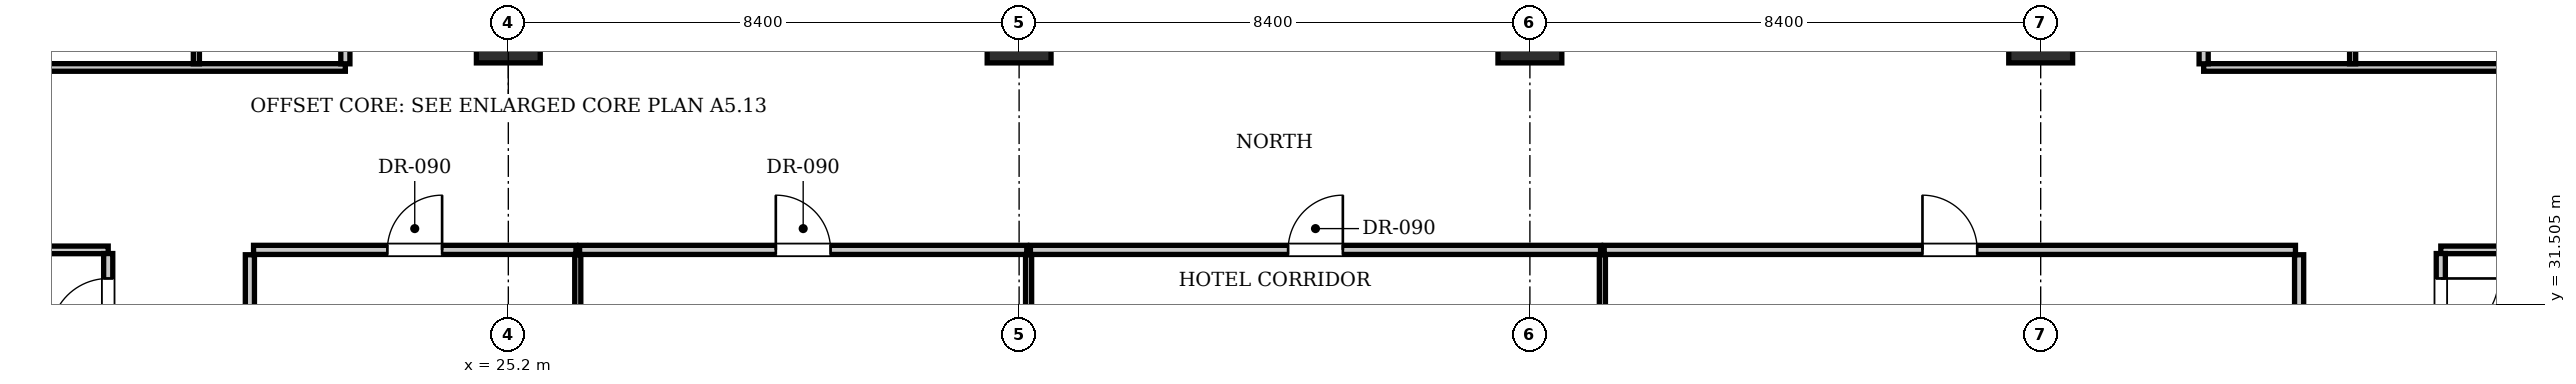
"""IFC4 building model, lengths in metres.
Left out: names, types, materials, properties, quantities, classifications, styles, units other than length and angle.
Written with IfcOpenShell. Run it as: python <this file> out.ifc"""

import sys

from ifc_helpers import new_model, si_unit, direction, frame, frame_2d, origin, origin_2d, place, context, subcontext, project, spatial, rectangle, extrude, element, fill, save


model = new_model("IFC4")
c1 = context("Model", 3, precision=1e-05, world=origin(), true_north=direction((0.0, 1.0)))
c2 = subcontext(c1, "Body", "Model", "MODEL_VIEW")
j1 = project(units=[si_unit("LENGTHUNIT", "METRE"), si_unit("PLANEANGLEUNIT", "RADIAN")], contexts=[c1])
p1 = place(None, origin())
s1 = spatial("IfcSite", under=j1, at=p1, CompositionType="ELEMENT")
p2 = place(p1, origin())
s2 = spatial("IfcBuilding", under=s1, at=p2, CompositionType="ELEMENT")
p3 = place(p2, frame((0.0, 0.0, 107.8)))
s3 = spatial("IfcBuildingStorey", under=s2, at=p3, CompositionType="ELEMENT", Elevation=107.8)
for number, where, z_axis, x_axis in (
    (1, (25.2, 36.0, 0.0), (0.0, 0.0, 1.0), (1.0, 0.0, 0.0)),
    (2, (33.6, 36.0, 0.0), (0.0, 0.0, 1.0), (1.0, 0.0, 0.0)),
    (3, (42.0, 36.0, 0.0), (0.0, 0.0, 1.0), (1.0, 0.0, 0.0)),
    (4, (50.4, 36.0, 0.0), (0.0, 0.0, 1.0), (1.0, 0.0, 0.0)),
):
    element("IfcColumn", number, at=place(p3, frame(where, z_axis=z_axis, x_axis=x_axis)), inside=s3, PredefinedType="COLUMN", context=c2, shape_type="SweptSolid", body=[
        extrude(rectangle(XDim=1.05, YDim=1.05, at=origin_2d()), origin(), (0.0, 0.0, 1.0), 3.85),
    ])
p4 = place(p3, frame((20.95, 24.98, 0.0), z_axis=(0.0, 0.0, 1.0), x_axis=(0.0, 1.0, 0.0)))
e5 = element("IfcWall", 5, at=p4, inside=s3, PredefinedType="PARTITIONING", context=c2, shape_type="SweptSolid", body=[
    extrude(rectangle(XDim=7.34, YDim=0.15, at=frame_2d((3.67, 0.0))), origin(), (0.0, 0.0, 1.0), 3.293),
])
p5 = place(p3, frame((54.65, 24.98, 0.0), z_axis=(0.0, 0.0, 1.0), x_axis=(0.0, 1.0, 0.0)))
e6 = element("IfcWall", 6, at=p5, inside=s3, PredefinedType="PARTITIONING", context=c2, shape_type="SweptSolid", body=[
    extrude(rectangle(XDim=7.34, YDim=0.15, at=frame_2d((3.67, 0.0))), origin(), (0.0, 0.0, 1.0), 3.3),
])
p6 = place(p3, frame((21.01, 32.4, 0.0), z_axis=(0.0, 0.0, 1.0), x_axis=(1.0, 0.0, 0.0)))
e7 = element("IfcWall", 7, at=p6, inside=s3, PredefinedType="PARTITIONING", context=c2, shape_type="SweptSolid", body=[
    extrude(rectangle(XDim=5.302, YDim=0.15, at=frame_2d((2.651, 0.0))), origin(), (0.0, 0.0, 1.0), 3.61),
])
p7 = place(p6, frame((2.201, 0.0, 0.0)))
e8 = element("IfcOpeningElement", 8, at=p7, cuts=e7, PredefinedType="OPENING", context=c2, shape_type="SweptSolid", body=[
    extrude(rectangle(XDim=0.9, YDim=2.1, at=frame_2d((0.45, 1.05))), frame((0.0, 0.085, 0.0), z_axis=(0.0, -1.0, 0.0), x_axis=(1.0, 0.0, 0.0)), (0.0, 0.0, 1.0), 0.17),
])
p8 = place(p3, frame((26.342, 24.98, 0.0), z_axis=(0.0, 0.0, 1.0), x_axis=(0.0, 1.0, 0.0)))
e9 = element("IfcWall", 9, at=p8, inside=s3, PredefinedType="PARTITIONING", context=c2, shape_type="SweptSolid", body=[
    extrude(rectangle(XDim=7.34, YDim=0.1, at=frame_2d((3.67, 0.0))), origin(), (0.0, 0.0, 1.0), 3.61),
])
p9 = place(p3, frame((26.372, 32.4, 0.0), z_axis=(0.0, 0.0, 1.0), x_axis=(1.0, 0.0, 0.0)))
e10 = element("IfcWall", 10, at=p9, inside=s3, PredefinedType="PARTITIONING", context=c2, shape_type="SweptSolid", body=[
    extrude(rectangle(XDim=7.354, YDim=0.15, at=frame_2d((3.677, 0.0))), origin(), (0.0, 0.0, 1.0), 3.61),
])
p10 = place(p9, frame((3.227, 0.0, 0.0)))
e11 = element("IfcOpeningElement", 11, at=p10, cuts=e10, PredefinedType="OPENING", context=c2, shape_type="SweptSolid", body=[
    extrude(rectangle(XDim=0.9, YDim=2.1, at=frame_2d((0.45, 1.05))), frame((0.0, 0.085, 0.0), z_axis=(0.0, -1.0, 0.0), x_axis=(1.0, 0.0, 0.0)), (0.0, 0.0, 1.0), 0.17),
])
p11 = place(p3, frame((33.756, 24.98, 0.0), z_axis=(0.0, 0.0, 1.0), x_axis=(0.0, 1.0, 0.0)))
e12 = element("IfcWall", 12, at=p11, inside=s3, PredefinedType="PARTITIONING", context=c2, shape_type="SweptSolid", body=[
    extrude(rectangle(XDim=7.34, YDim=0.1, at=frame_2d((3.67, 0.0))), origin(), (0.0, 0.0, 1.0), 2.999),
])
p12 = place(p3, frame((33.786, 32.4, 0.0), z_axis=(0.0, 0.0, 1.0), x_axis=(1.0, 0.0, 0.0)))
e13 = element("IfcWall", 13, at=p12, inside=s3, PredefinedType="PARTITIONING", context=c2, shape_type="SweptSolid", body=[
    extrude(rectangle(XDim=9.376, YDim=0.15, at=frame_2d((4.688, 0.0))), origin(), (0.0, 0.0, 1.0), 3.61),
])
p13 = place(p12, frame((4.238, 0.0, 0.0)))
e14 = element("IfcOpeningElement", 14, at=p13, cuts=e13, PredefinedType="OPENING", context=c2, shape_type="SweptSolid", body=[
    extrude(rectangle(XDim=0.9, YDim=2.1, at=frame_2d((0.45, 1.05))), frame((0.0, 0.085, 0.0), z_axis=(0.0, -1.0, 0.0), x_axis=(1.0, 0.0, 0.0)), (0.0, 0.0, 1.0), 0.17),
])
p14 = place(p3, frame((43.192, 24.98, 0.0), z_axis=(0.0, 0.0, 1.0), x_axis=(0.0, 1.0, 0.0)))
e15 = element("IfcWall", 15, at=p14, inside=s3, PredefinedType="PARTITIONING", context=c2, shape_type="SweptSolid", body=[
    extrude(rectangle(XDim=7.34, YDim=0.1, at=frame_2d((3.67, 0.0))), origin(), (0.0, 0.0, 1.0), 3.61),
])
p15 = place(p3, frame((43.222, 32.4, 0.0), z_axis=(0.0, 0.0, 1.0), x_axis=(1.0, 0.0, 0.0)))
e16 = element("IfcWall", 16, at=p15, inside=s3, PredefinedType="PARTITIONING", context=c2, shape_type="SweptSolid", body=[
    extrude(rectangle(XDim=11.368, YDim=0.15, at=frame_2d((5.684, 0.0))), origin(), (0.0, 0.0, 1.0), 3.61),
])
p16 = place(p15, frame((5.234, 0.0, 0.0)))
e17 = element("IfcOpeningElement", 17, at=p16, cuts=e16, PredefinedType="OPENING", context=c2, shape_type="SweptSolid", body=[
    extrude(rectangle(XDim=0.9, YDim=2.1, at=frame_2d((0.45, 1.05))), frame((0.0, 0.085, 0.0), z_axis=(0.0, -1.0, 0.0), x_axis=(1.0, 0.0, 0.0)), (0.0, 0.0, 1.0), 0.17),
])
p17 = place(p3, frame((10.9, 32.4, 0.0), z_axis=(0.0, 0.0, 1.0), x_axis=(1.0, 0.0, 0.0)))
e18 = element("IfcWall", 18, at=p17, inside=s3, PredefinedType="PARTITIONING", context=c2, shape_type="SweptSolid", body=[
    extrude(rectangle(XDim=7.72, YDim=0.125, at=frame_2d((3.86, 0.0))), origin(), (0.0, 0.0, 1.0), 3.61),
])
p18 = place(p3, frame((56.98, 32.4, 0.0), z_axis=(0.0, 0.0, 1.0), x_axis=(1.0, 0.0, 0.0)))
e19 = element("IfcWall", 19, at=p18, inside=s3, PredefinedType="PARTITIONING", context=c2, shape_type="SweptSolid", body=[
    extrude(rectangle(XDim=7.72, YDim=0.125, at=frame_2d((3.86, 0.0))), origin(), (0.0, 0.0, 1.0), 3.61),
])
p19 = place(p3, frame((18.62, 30.57, 0.0), z_axis=(0.0, 0.0, 1.0), x_axis=(0.0, 1.0, 0.0)))
e20 = element("IfcWall", 20, at=p19, inside=s3, PredefinedType="PARTITIONING", context=c2, shape_type="SweptSolid", body=[
    extrude(rectangle(XDim=1.77, YDim=0.15, at=frame_2d((0.885, 0.0))), origin(), (0.0, 0.0, 1.0), 3.61),
])
p20 = place(p19, frame((0.41, 0.0, 0.0)))
e21 = element("IfcOpeningElement", 21, at=p20, cuts=e20, PredefinedType="OPENING", context=c2, shape_type="SweptSolid", body=[
    extrude(rectangle(XDim=0.95, YDim=2.15, at=frame_2d((0.475, 1.075))), frame((0.0, 0.085, 0.0), z_axis=(0.0, -1.0, 0.0), x_axis=(1.0, 0.0, 0.0)), (0.0, 0.0, 1.0), 0.17),
])
p21 = place(p3, frame((56.98, 30.57, 0.0), z_axis=(0.0, 0.0, 1.0), x_axis=(0.0, 1.0, 0.0)))
e22 = element("IfcWall", 22, at=p21, inside=s3, PredefinedType="PARTITIONING", context=c2, shape_type="SweptSolid", body=[
    extrude(rectangle(XDim=1.77, YDim=0.15, at=frame_2d((0.885, 0.0))), origin(), (0.0, 0.0, 1.0), 3.61),
])
p22 = place(p21, frame((0.41, 0.0, 0.0)))
e23 = element("IfcOpeningElement", 23, at=p22, cuts=e22, PredefinedType="OPENING", context=c2, shape_type="SweptSolid", body=[
    extrude(rectangle(XDim=0.95, YDim=2.15, at=frame_2d((0.475, 1.075))), frame((0.0, 0.085, 0.0), z_axis=(0.0, -1.0, 0.0), x_axis=(1.0, 0.0, 0.0)), (0.0, 0.0, 1.0), 0.17),
])
p23 = place(p3, frame((10.9, 35.4, 0.0), z_axis=(0.0, 0.0, 1.0), x_axis=(1.0, 0.0, 0.0)))
e24 = element("IfcWall", 24, at=p23, inside=s3, PredefinedType="PARTITIONING", context=c2, shape_type="SweptSolid", body=[
    extrude(rectangle(XDim=11.62, YDim=0.125, at=frame_2d((5.81, 0.0))), origin(), (0.0, 0.0, 1.0), 3.61),
])
p24 = place(p3, frame((53.08, 35.4, 0.0), z_axis=(0.0, 0.0, 1.0), x_axis=(1.0, 0.0, 0.0)))
e25 = element("IfcWall", 25, at=p24, inside=s3, PredefinedType="PARTITIONING", context=c2, shape_type="SweptSolid", body=[
    extrude(rectangle(XDim=11.62, YDim=0.125, at=frame_2d((5.81, 0.0))), origin(), (0.0, 0.0, 1.0), 3.61),
])
p25 = place(p3, frame((22.52, 35.46, 0.0), z_axis=(0.0, 0.0, 1.0), x_axis=(0.0, 1.0, 0.0)))
e26 = element("IfcWall", 26, at=p25, inside=s3, PredefinedType="PARTITIONING", context=c2, shape_type="SweptSolid", body=[
    extrude(rectangle(XDim=2.29, YDim=0.15, at=frame_2d((1.145, 0.0))), origin(), (0.0, 0.0, 1.0), 3.61),
])
p26 = place(p3, frame((20.07, 35.46, 0.0), z_axis=(0.0, 0.0, 1.0), x_axis=(0.0, 1.0, 0.0)))
e27 = element("IfcWall", 27, at=p26, inside=s3, PredefinedType="PARTITIONING", context=c2, shape_type="SweptSolid", body=[
    extrude(rectangle(XDim=2.29, YDim=0.1, at=frame_2d((1.145, 0.0))), origin(), (0.0, 0.0, 1.0), 3.61),
])
p27 = place(p3, frame((53.08, 35.46, 0.0), z_axis=(0.0, 0.0, 1.0), x_axis=(0.0, 1.0, 0.0)))
e28 = element("IfcWall", 28, at=p27, inside=s3, PredefinedType="PARTITIONING", context=c2, shape_type="SweptSolid", body=[
    extrude(rectangle(XDim=2.29, YDim=0.15, at=frame_2d((1.145, 0.0))), origin(), (0.0, 0.0, 1.0), 3.61),
])
p28 = place(p3, frame((55.53, 35.46, 0.0), z_axis=(0.0, 0.0, 1.0), x_axis=(0.0, 1.0, 0.0)))
e29 = element("IfcWall", 29, at=p28, inside=s3, PredefinedType="PARTITIONING", context=c2, shape_type="SweptSolid", body=[
    extrude(rectangle(XDim=2.29, YDim=0.1, at=frame_2d((1.145, 0.0))), origin(), (0.0, 0.0, 1.0), 3.61),
])
p29 = place(p7, origin())
e30 = element("IfcDoor", 30, at=p29, inside=s3, OperationType="SINGLE_SWING_RIGHT", PredefinedType="DOOR", context=c2, shape_type="SweptSolid", body=[
    extrude(rectangle(XDim=0.9, YDim=2.1, at=frame_2d((0.45, 1.05))), frame((0.0, 0.025, 0.0), z_axis=(0.0, -1.0, 0.0), x_axis=(1.0, 0.0, 0.0)), (0.0, 0.0, 1.0), 0.05),
])
fill(e8, e30)
p30 = place(p10, origin())
e31 = element("IfcDoor", 31, at=p30, inside=s3, OperationType="SINGLE_SWING_LEFT", PredefinedType="DOOR", context=c2, shape_type="SweptSolid", body=[
    extrude(rectangle(XDim=0.9, YDim=2.1, at=frame_2d((0.45, 1.05))), frame((0.0, 0.025, 0.0), z_axis=(0.0, -1.0, 0.0), x_axis=(1.0, 0.0, 0.0)), (0.0, 0.0, 1.0), 0.05),
])
fill(e11, e31)
p31 = place(p13, origin())
e32 = element("IfcDoor", 32, at=p31, inside=s3, OperationType="SINGLE_SWING_RIGHT", PredefinedType="DOOR", context=c2, shape_type="SweptSolid", body=[
    extrude(rectangle(XDim=0.9, YDim=2.1, at=frame_2d((0.45, 1.05))), frame((0.0, 0.025, 0.0), z_axis=(0.0, -1.0, 0.0), x_axis=(1.0, 0.0, 0.0)), (0.0, 0.0, 1.0), 0.05),
])
fill(e14, e32)
p32 = place(p16, origin())
e33 = element("IfcDoor", 33, at=p32, inside=s3, OperationType="SINGLE_SWING_LEFT", PredefinedType="DOOR", context=c2, shape_type="SweptSolid", body=[
    extrude(rectangle(XDim=0.9, YDim=2.1, at=frame_2d((0.45, 1.05))), frame((0.0, 0.025, 0.0), z_axis=(0.0, -1.0, 0.0), x_axis=(1.0, 0.0, 0.0)), (0.0, 0.0, 1.0), 0.05),
])
fill(e17, e33)
p33 = place(p20, origin())
e34 = element("IfcDoor", 34, at=p33, inside=s3, OperationType="SINGLE_SWING_LEFT", PredefinedType="DOOR", context=c2, shape_type="SweptSolid", body=[
    extrude(rectangle(XDim=0.95, YDim=2.15, at=frame_2d((0.475, 1.075))), frame((0.0, 0.025, 0.0), z_axis=(0.0, -1.0, 0.0), x_axis=(1.0, 0.0, 0.0)), (0.0, 0.0, 1.0), 0.05),
])
fill(e21, e34)
p34 = place(p22, frame((0.95, 0.0, 0.0), z_axis=(0.0, 0.0, 1.0), x_axis=(-1.0, 0.0, 0.0)))
e35 = element("IfcDoor", 35, at=p34, inside=s3, OperationType="SINGLE_SWING_LEFT", PredefinedType="DOOR", context=c2, shape_type="SweptSolid", body=[
    extrude(rectangle(XDim=0.95, YDim=2.15, at=frame_2d((0.475, 1.075))), frame((0.0, 0.025, 0.0), z_axis=(0.0, -1.0, 0.0), x_axis=(1.0, 0.0, 0.0)), (0.0, 0.0, 1.0), 0.05),
])
fill(e23, e35)
save(model, sys.argv[1])
